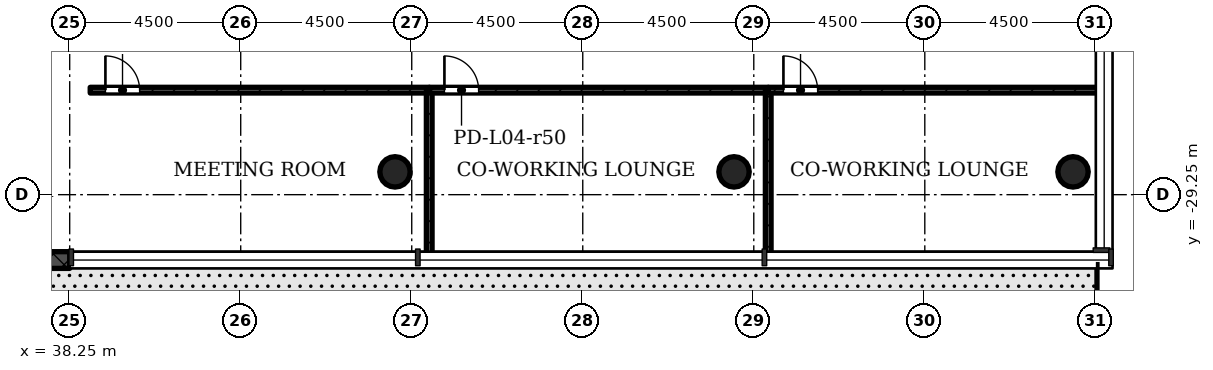
"""IFC4 building model, lengths in metres.
Left out: names, types, materials, properties, quantities, classifications, styles, units other than length and angle.
Written with IfcOpenShell. Run it as: python <this file> out.ifc"""

import sys

from ifc_helpers import new_model, si_unit, direction, frame, frame_2d, origin, origin_2d, place, context, subcontext, project, spatial, rectangle, hollow_circle, extrude, element, fill, save


model = new_model("IFC4")
c1 = context("Model", 3, precision=1e-05, world=origin(), true_north=direction((0.0, 1.0)))
c2 = subcontext(c1, "Body", "Model", "MODEL_VIEW")
j1 = project(units=[si_unit("LENGTHUNIT", "METRE"), si_unit("PLANEANGLEUNIT", "RADIAN")], contexts=[c1])
p1 = place(None, origin())
s1 = spatial("IfcSite", under=j1, at=p1, CompositionType="ELEMENT")
p2 = place(p1, origin())
s2 = spatial("IfcBuilding", under=s1, at=p2, CompositionType="ELEMENT")
p3 = place(p2, frame((0.0, 0.0, 20.0)))
s3 = spatial("IfcBuildingStorey", under=s2, at=p3, CompositionType="ELEMENT", Elevation=20.0)
for number, where, z_axis, x_axis in (
    (1, (46.81, -28.65, 0.0), (0.0, 0.0, 1.0), (1.0, 0.0, 0.0)),
    (2, (55.73, -28.65, 0.0), (0.0, 0.0, 1.0), (1.0, 0.0, 0.0)),
    (3, (64.65, -28.65, 0.0), (0.0, 0.0, 1.0), (1.0, 0.0, 0.0)),
):
    element("IfcColumn", number, at=place(p3, frame(where, z_axis=z_axis, x_axis=x_axis)), inside=s3, PredefinedType="COLUMN", context=c2, shape_type="SweptSolid", body=[
        extrude(hollow_circle(Radius=0.4, WallThickness=0.028, at=origin_2d()), origin(), (0.0, 0.0, 1.0), 4.08),
    ])
p4 = place(p3, frame((33.75, -30.97, -0.02), z_axis=(0.0, 0.0, 1.0), x_axis=(1.0, 0.0, 0.0)))
e4 = element("IfcWall", 4, at=p4, inside=s3, PredefinedType="STANDARD", context=c2, shape_type="SweptSolid", body=[
    extrude(rectangle(XDim=4.5, YDim=0.44, at=frame_2d((2.25, 0.0))), origin(), (0.0, 0.0, 1.0), 4.52),
])
p5 = place(p4, frame((1.35, 0.0, 0.02)))
e5 = element("IfcOpeningElement", 5, at=p5, cuts=e4, PredefinedType="OPENING", context=c2, shape_type="SweptSolid", body=[
    extrude(rectangle(XDim=1.8, YDim=2.1, at=frame_2d((0.9, 1.05))), frame((0.0, 0.23, 0.0), z_axis=(0.0, -1.0, 0.0), x_axis=(1.0, 0.0, 0.0)), (0.0, 0.0, 1.0), 0.46),
])
p6 = place(p3, frame((38.79, -26.5, 0.0), z_axis=(0.0, 0.0, 1.0), x_axis=(1.0, 0.0, 0.0)))
e6 = element("IfcWall", 6, at=p6, inside=s3, PredefinedType="PARTITIONING", context=c2, shape_type="SweptSolid", body=[
    extrude(rectangle(XDim=8.92, YDim=0.15, at=frame_2d((4.46, 0.0))), origin(), (0.0, 0.0, 1.0), 4.075),
])
p7 = place(p6, frame((0.4, 0.0, 0.0)))
e7 = element("IfcOpeningElement", 7, at=p7, cuts=e6, PredefinedType="OPENING", context=c2, shape_type="SweptSolid", body=[
    extrude(rectangle(XDim=0.9, YDim=2.1, at=frame_2d((0.45, 1.05))), frame((0.0, 0.085, 0.0), z_axis=(0.0, -1.0, 0.0), x_axis=(1.0, 0.0, 0.0)), (0.0, 0.0, 1.0), 0.17),
])
p8 = place(p3, frame((47.71, -26.5, 0.0), z_axis=(0.0, 0.0, 1.0), x_axis=(0.0, -1.0, 0.0)))
e8 = element("IfcWall", 8, at=p8, inside=s3, PredefinedType="PARTITIONING", context=c2, shape_type="SweptSolid", body=[
    extrude(rectangle(XDim=4.35, YDim=0.15, at=frame_2d((2.175, 0.0))), origin(), (0.0, 0.0, 1.0), 4.075),
])
p9 = place(p3, frame((47.71, -26.5, 0.0), z_axis=(0.0, 0.0, 1.0), x_axis=(1.0, 0.0, 0.0)))
e9 = element("IfcWall", 9, at=p9, inside=s3, PredefinedType="PARTITIONING", context=c2, shape_type="SweptSolid", body=[
    extrude(rectangle(XDim=8.92, YDim=0.15, at=frame_2d((4.46, 0.0))), origin(), (0.0, 0.0, 1.0), 4.075),
])
p10 = place(p9, frame((0.4, 0.0, 0.0)))
e10 = element("IfcOpeningElement", 10, at=p10, cuts=e9, PredefinedType="OPENING", context=c2, shape_type="SweptSolid", body=[
    extrude(rectangle(XDim=0.9, YDim=2.1, at=frame_2d((0.45, 1.05))), frame((0.0, 0.085, 0.0), z_axis=(0.0, -1.0, 0.0), x_axis=(1.0, 0.0, 0.0)), (0.0, 0.0, 1.0), 0.17),
])
p11 = place(p3, frame((56.63, -26.5, 0.0), z_axis=(0.0, 0.0, 1.0), x_axis=(0.0, -1.0, 0.0)))
e11 = element("IfcWall", 11, at=p11, inside=s3, PredefinedType="PARTITIONING", context=c2, shape_type="SweptSolid", body=[
    extrude(rectangle(XDim=4.35, YDim=0.15, at=frame_2d((2.175, 0.0))), origin(), (0.0, 0.0, 1.0), 4.075),
])
p12 = place(p3, frame((56.63, -26.5, 0.0), z_axis=(0.0, 0.0, 1.0), x_axis=(1.0, 0.0, 0.0)))
e12 = element("IfcWall", 12, at=p12, inside=s3, PredefinedType="PARTITIONING", context=c2, shape_type="SweptSolid", body=[
    extrude(rectangle(XDim=8.72, YDim=0.15, at=frame_2d((4.36, 0.0))), origin(), (0.0, 0.0, 1.0), 4.075),
])
p13 = place(p12, frame((0.4, 0.0, 0.0)))
e13 = element("IfcOpeningElement", 13, at=p13, cuts=e12, PredefinedType="OPENING", context=c2, shape_type="SweptSolid", body=[
    extrude(rectangle(XDim=0.9, YDim=2.1, at=frame_2d((0.45, 1.05))), frame((0.0, 0.085, 0.0), z_axis=(0.0, -1.0, 0.0), x_axis=(1.0, 0.0, 0.0)), (0.0, 0.0, 1.0), 0.17),
])
p14 = place(p7, origin())
e14 = element("IfcDoor", 14, at=p14, inside=s3, OperationType="SINGLE_SWING_RIGHT", PredefinedType="DOOR", context=c2, shape_type="SweptSolid", body=[
    extrude(rectangle(XDim=0.9, YDim=2.1, at=frame_2d((0.45, 1.05))), frame((0.0, 0.025, 0.0), z_axis=(0.0, -1.0, 0.0), x_axis=(1.0, 0.0, 0.0)), (0.0, 0.0, 1.0), 0.05),
])
fill(e7, e14)
p15 = place(p10, origin())
e15 = element("IfcDoor", 15, at=p15, inside=s3, OperationType="SINGLE_SWING_RIGHT", PredefinedType="DOOR", context=c2, shape_type="SweptSolid", body=[
    extrude(rectangle(XDim=0.9, YDim=2.1, at=frame_2d((0.45, 1.05))), frame((0.0, 0.025, 0.0), z_axis=(0.0, -1.0, 0.0), x_axis=(1.0, 0.0, 0.0)), (0.0, 0.0, 1.0), 0.05),
])
fill(e10, e15)
p16 = place(p13, origin())
e16 = element("IfcDoor", 16, at=p16, inside=s3, OperationType="SINGLE_SWING_RIGHT", PredefinedType="DOOR", context=c2, shape_type="SweptSolid", body=[
    extrude(rectangle(XDim=0.9, YDim=2.1, at=frame_2d((0.45, 1.05))), frame((0.0, 0.025, 0.0), z_axis=(0.0, -1.0, 0.0), x_axis=(1.0, 0.0, 0.0)), (0.0, 0.0, 1.0), 0.05),
])
fill(e13, e16)
save(model, sys.argv[1])
